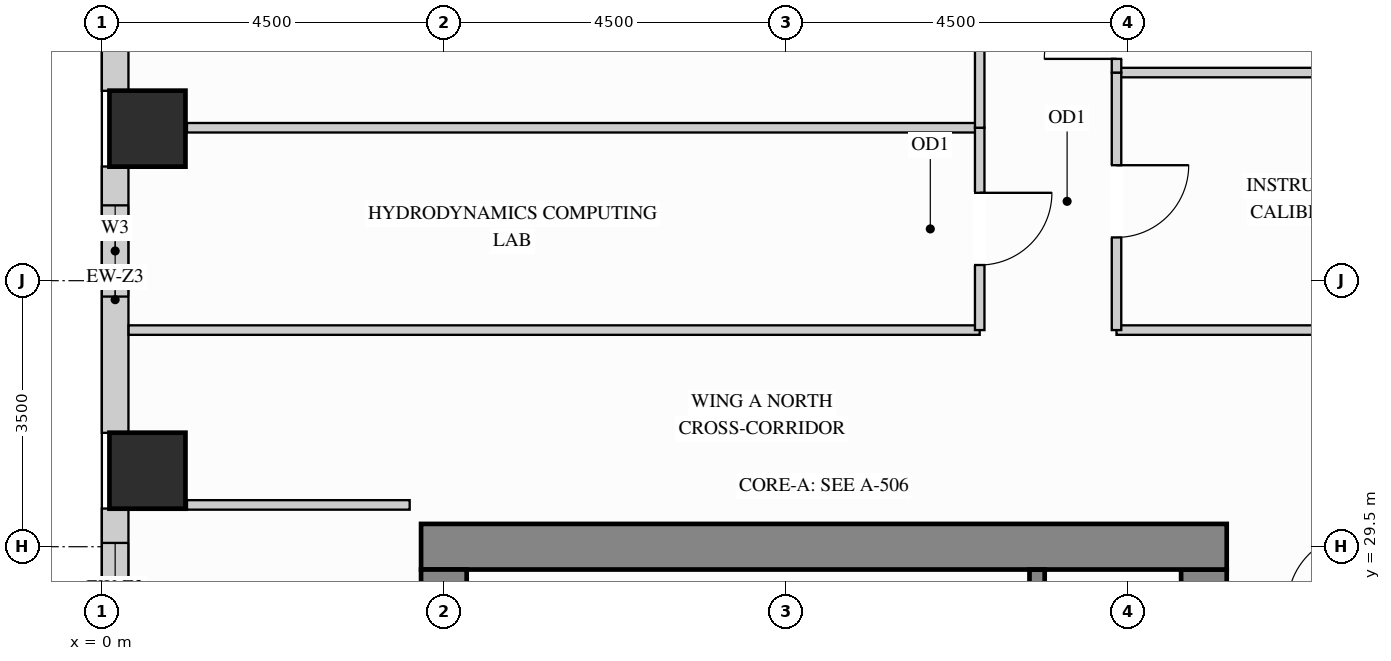
"""IFC4 building model, lengths in metres.
Left out: names, types, materials, properties, quantities, classifications, styles, units other than length and angle.
Written with IfcOpenShell. Run it as: python <this file> out.ifc"""

import sys

from ifc_helpers import new_model, si_unit, direction, frame, frame_2d, origin, origin_2d, place, context, subcontext, project, spatial, rectangle, extrude, source, transform, mapped, element, fill, save


model = new_model("IFC4")
c1 = context("Model", 3, precision=1e-05, world=origin(), true_north=direction((0.0, 1.0)))
c2 = subcontext(c1, "Body", "Model", "MODEL_VIEW")
j1 = project(units=[si_unit("LENGTHUNIT", "METRE"), si_unit("PLANEANGLEUNIT", "RADIAN")], contexts=[c1])
p1 = place(None, origin())
s1 = spatial("IfcSite", under=j1, at=p1, CompositionType="ELEMENT")
p2 = place(p1, origin())
s2 = spatial("IfcBuilding", under=s1, at=p2, CompositionType="ELEMENT")
p3 = place(p2, frame((0.0, 0.0, 161.1)))
s3 = spatial("IfcBuildingStorey", under=s2, at=p3, CompositionType="ELEMENT", Elevation=161.1)
m1 = source(origin(), c2, "Body", "SweptSolid", [
    extrude(rectangle(XDim=1.0, YDim=1.0, at=origin_2d()), origin(), (0.0, 0.0, 1.0), 3.4),
])
for number, where, z_axis, x_axis in (
    (1, (0.6, 30.5, 0.0), (0.0, 0.0, 1.0), (1.0, 0.0, 0.0)),
    (2, (0.6, 35.0, 0.0), (0.0, 0.0, 1.0), (1.0, 0.0, 0.0)),
):
    element("IfcColumn", number, at=place(p3, frame(where, z_axis=z_axis, x_axis=x_axis)), inside=s3, PredefinedType="COLUMN", context=c2, shape_type="MappedRepresentation", body=[
        mapped(m1, transform((0.0, 0.0, 0.0), x_axis=(1.0, 0.0, 0.0), y_axis=(0.0, 1.0, 0.0), z_axis=(0.0, 0.0, 1.0))),
    ])
m2 = source(origin(), c2, "Body", "SweptSolid", [
    extrude(rectangle(XDim=8.32, YDim=0.6, at=frame_2d((4.16, 0.0))), origin(), (0.0, 0.0, 1.0), 3.4),
])
p4 = place(p3, frame((14.5, 20.88, 0.0), z_axis=(0.0, 0.0, 1.0), x_axis=(0.0, 1.0, 0.0)))
e3 = element("IfcWall", 3, at=p4, inside=s3, PredefinedType="SHEAR", context=c2, shape_type="MappedRepresentation", body=[
    mapped(m2, transform((0.0, 0.0, 0.0), x_axis=(1.0, 0.0, 0.0), y_axis=(0.0, 1.0, 0.0), z_axis=(0.0, 0.0, 1.0))),
])
m3 = source(origin(), c2, "Body", "SweptSolid", [
    extrude(rectangle(XDim=10.6, YDim=0.6, at=frame_2d((5.3, 0.0))), origin(), (0.0, 0.0, 1.0), 3.4),
])
p5 = place(p3, frame((4.2, 29.5, 0.0), z_axis=(0.0, 0.0, 1.0), x_axis=(1.0, 0.0, 0.0)))
e4 = element("IfcWall", 4, at=p5, inside=s3, PredefinedType="SHEAR", context=c2, shape_type="MappedRepresentation", body=[
    mapped(m3, transform((0.0, 0.0, 0.0), x_axis=(1.0, 0.0, 0.0), y_axis=(0.0, 1.0, 0.0), z_axis=(0.0, 0.0, 1.0))),
])
m4 = source(origin(), c2, "Body", "SweptSolid", [
    extrude(rectangle(XDim=20.4, YDim=0.6, at=frame_2d((10.2, 0.0))), origin(), (0.0, 0.0, 1.0), 3.4),
])
p6 = place(p3, frame((4.5, 8.8, 0.0), z_axis=(0.0, 0.0, 1.0), x_axis=(0.0, 1.0, 0.0)))
e5 = element("IfcWall", 5, at=p6, inside=s3, PredefinedType="SHEAR", context=c2, shape_type="MappedRepresentation", body=[
    mapped(m4, transform((0.0, 0.0, 0.0), x_axis=(1.0, 0.0, 0.0), y_axis=(0.0, 1.0, 0.0), z_axis=(0.0, 0.0, 1.0))),
])
m5 = source(origin(), c2, "Body", "SweptSolid", [
    extrude(rectangle(XDim=1.904, YDim=0.35, at=frame_2d((0.952, 0.0))), origin(), (0.0, 0.0, 1.0), 2.612),
])
p7 = place(p3, frame((0.175, 37.402, 0.0), z_axis=(0.0, 0.0, 1.0), x_axis=(0.0, -1.0, 0.0)))
e6 = element("IfcWall", 6, at=p7, inside=s3, PredefinedType="SOLIDWALL", context=c2, shape_type="MappedRepresentation", body=[
    mapped(m5, transform((0.0, 0.0, 0.0), x_axis=(1.0, 0.0, 0.0), y_axis=(0.0, 1.0, 0.0), z_axis=(0.0, 0.0, 1.0))),
])
p8 = place(p3, frame((0.175, 34.502, 0.0), z_axis=(0.0, 0.0, 1.0), x_axis=(0.0, -1.0, 0.0)))
e7 = element("IfcWall", 7, at=p8, inside=s3, PredefinedType="SOLIDWALL", context=c2, shape_type="SweptSolid", body=[
    extrude(rectangle(XDim=3.504, YDim=0.35, at=frame_2d((1.752, 0.0))), origin(), (0.0, 0.0, 1.0), 2.612),
])
p9 = place(p8, frame((0.511, 0.0, 0.78)))
e8 = element("IfcOpeningElement", 8, at=p9, cuts=e7, PredefinedType="OPENING", context=c2, shape_type="SweptSolid", body=[
    extrude(rectangle(XDim=1.2, YDim=1.652, at=frame_2d((0.6, 0.826))), frame((0.0, 0.185, 0.0), z_axis=(0.0, -1.0, 0.0), x_axis=(1.0, 0.0, 0.0)), (0.0, 0.0, 1.0), 0.37),
])
p10 = place(p3, frame((0.175, 30.002, 0.0), z_axis=(0.0, 0.0, 1.0), x_axis=(0.0, -1.0, 0.0)))
e9 = element("IfcWall", 9, at=p10, inside=s3, PredefinedType="SOLIDWALL", context=c2, shape_type="SweptSolid", body=[
    extrude(rectangle(XDim=2.704, YDim=0.35, at=frame_2d((1.352, 0.0))), origin(), (0.0, 0.0, 1.0), 2.612),
])
p11 = place(p10, frame((0.452, 0.0, 0.78)))
e10 = element("IfcOpeningElement", 10, at=p11, cuts=e9, PredefinedType="OPENING", context=c2, shape_type="SweptSolid", body=[
    extrude(rectangle(XDim=1.8, YDim=1.652, at=frame_2d((0.9, 0.826))), frame((0.0, 0.185, 0.0), z_axis=(0.0, -1.0, 0.0), x_axis=(1.0, 0.0, 0.0)), (0.0, 0.0, 1.0), 0.37),
])
m6 = source(origin(), c2, "Body", "SweptSolid", [
    extrude(rectangle(XDim=5.798, YDim=0.125, at=frame_2d((2.899, 0.0))), origin(), (0.0, 0.0, 1.0), 3.385),
])
for number, where, z_axis, x_axis in (
    (11, (13.35, 35.738, 0.0), (0.0, 0.0, 1.0), (1.0, 0.0, 0.0)),
    (12, (13.35, 32.35, 0.0), (0.0, 0.0, 1.0), (1.0, 0.0, 0.0)),
):
    element("IfcWall", number, at=place(p3, frame(where, z_axis=z_axis, x_axis=x_axis)), inside=s3, PredefinedType="PARTITIONING", context=c2, shape_type="MappedRepresentation", body=[
        mapped(m6, transform((0.0, 0.0, 0.0), x_axis=(1.0, 0.0, 0.0), y_axis=(0.0, 1.0, 0.0), z_axis=(0.0, 0.0, 1.0))),
    ])
m7 = source(origin(), c2, "Body", "SweptSolid", [
    extrude(rectangle(XDim=11.198, YDim=0.125, at=frame_2d((5.599, 0.0))), origin(), (0.0, 0.0, 1.0), 3.385),
])
p12 = place(p3, frame((0.352, 32.35, 0.0), z_axis=(0.0, 0.0, 1.0), x_axis=(1.0, 0.0, 0.0)))
e13 = element("IfcWall", 13, at=p12, inside=s3, PredefinedType="PARTITIONING", context=c2, shape_type="MappedRepresentation", body=[
    mapped(m7, transform((0.0, 0.0, 0.0), x_axis=(1.0, 0.0, 0.0), y_axis=(0.0, 1.0, 0.0), z_axis=(0.0, 0.0, 1.0))),
])
m8 = source(origin(), c2, "Body", "SweptSolid", [
    extrude(rectangle(XDim=10.43, YDim=0.125, at=frame_2d((5.215, 0.0))), origin(), (0.0, 0.0, 1.0), 3.385),
])
p13 = place(p3, frame((1.12, 35.012, 0.0), z_axis=(0.0, 0.0, 1.0), x_axis=(1.0, 0.0, 0.0)))
e14 = element("IfcWall", 14, at=p13, inside=s3, PredefinedType="PARTITIONING", context=c2, shape_type="MappedRepresentation", body=[
    mapped(m8, transform((0.0, 0.0, 0.0), x_axis=(1.0, 0.0, 0.0), y_axis=(0.0, 1.0, 0.0), z_axis=(0.0, 0.0, 1.0))),
])
m9 = source(origin(), c2, "Body", "SweptSolid", [
    extrude(rectangle(XDim=2.93, YDim=0.125, at=frame_2d((1.465, 0.0))), origin(), (0.0, 0.0, 1.0), 3.385),
])
p14 = place(p3, frame((1.12, 30.05, 0.0), z_axis=(0.0, 0.0, 1.0), x_axis=(1.0, 0.0, 0.0)))
e15 = element("IfcWall", 15, at=p14, inside=s3, PredefinedType="PARTITIONING", context=c2, shape_type="MappedRepresentation", body=[
    mapped(m9, transform((0.0, 0.0, 0.0), x_axis=(1.0, 0.0, 0.0), y_axis=(0.0, 1.0, 0.0), z_axis=(0.0, 0.0, 1.0))),
])
p15 = place(p3, frame((13.35, 32.35, 0.0), z_axis=(0.0, 0.0, 1.0), x_axis=(0.0, 1.0, 0.0)))
e16 = element("IfcWall", 16, at=p15, inside=s3, PredefinedType="PARTITIONING", context=c2, shape_type="SweptSolid", body=[
    extrude(rectangle(XDim=3.388, YDim=0.125, at=frame_2d((1.694, 0.0))), origin(), (0.0, 0.0, 1.0), 3.385),
])
p16 = place(p15, frame((1.219, 0.0, 0.0)))
e17 = element("IfcOpeningElement", 17, at=p16, cuts=e16, PredefinedType="OPENING", context=c2, shape_type="SweptSolid", body=[
    extrude(rectangle(XDim=0.95, YDim=2.15, at=frame_2d((0.475, 1.075))), frame((0.0, 0.073, 0.0), z_axis=(0.0, -1.0, 0.0), x_axis=(1.0, 0.0, 0.0)), (0.0, 0.0, 1.0), 0.145),
])
p17 = place(p3, frame((13.35, 35.738, 0.0), z_axis=(0.0, 0.0, 1.0), x_axis=(0.0, 1.0, 0.0)))
e18 = element("IfcWall", 18, at=p17, inside=s3, PredefinedType="PARTITIONING", context=c2, shape_type="SweptSolid", body=[
    extrude(rectangle(XDim=2.662, YDim=0.125, at=frame_2d((1.331, 0.0))), origin(), (0.0, 0.0, 1.0), 3.385),
])
p18 = place(p17, frame((0.18, 0.0, 0.0)))
e19 = element("IfcOpeningElement", 19, at=p18, cuts=e18, PredefinedType="OPENING", context=c2, shape_type="SweptSolid", body=[
    extrude(rectangle(XDim=0.95, YDim=2.15, at=frame_2d((0.475, 1.075))), frame((0.0, 0.073, 0.0), z_axis=(0.0, -1.0, 0.0), x_axis=(1.0, 0.0, 0.0)), (0.0, 0.0, 1.0), 0.145),
])
p19 = place(p3, frame((11.55, 32.35, 0.0), z_axis=(0.0, 0.0, 1.0), x_axis=(0.0, 1.0, 0.0)))
e20 = element("IfcWall", 20, at=p19, inside=s3, PredefinedType="PARTITIONING", context=c2, shape_type="SweptSolid", body=[
    extrude(rectangle(XDim=2.662, YDim=0.125, at=frame_2d((1.331, 0.0))), origin(), (0.0, 0.0, 1.0), 3.385),
])
p20 = place(p19, frame((0.856, 0.0, 0.0)))
e21 = element("IfcOpeningElement", 21, at=p20, cuts=e20, PredefinedType="OPENING", context=c2, shape_type="SweptSolid", body=[
    extrude(rectangle(XDim=0.95, YDim=2.15, at=frame_2d((0.475, 1.075))), frame((0.0, 0.073, 0.0), z_axis=(0.0, -1.0, 0.0), x_axis=(1.0, 0.0, 0.0)), (0.0, 0.0, 1.0), 0.145),
])
p21 = place(p3, frame((11.55, 35.012, 0.0), z_axis=(0.0, 0.0, 1.0), x_axis=(0.0, 1.0, 0.0)))
e22 = element("IfcWall", 22, at=p21, inside=s3, PredefinedType="PARTITIONING", context=c2, shape_type="SweptSolid", body=[
    extrude(rectangle(XDim=3.388, YDim=0.125, at=frame_2d((1.694, 0.0))), origin(), (0.0, 0.0, 1.0), 3.385),
])
p22 = place(p21, frame((1.219, 0.0, 0.0)))
e23 = element("IfcOpeningElement", 23, at=p22, cuts=e22, PredefinedType="OPENING", context=c2, shape_type="SweptSolid", body=[
    extrude(rectangle(XDim=0.95, YDim=2.15, at=frame_2d((0.475, 1.075))), frame((0.0, 0.073, 0.0), z_axis=(0.0, -1.0, 0.0), x_axis=(1.0, 0.0, 0.0)), (0.0, 0.0, 1.0), 0.145),
])
m10 = source(origin(), c2, "Body", "SweptSolid", [
    extrude(rectangle(XDim=3.753, YDim=0.2, at=frame_2d((1.876, 0.0))), origin(), (0.0, 0.0, 1.0), 3.4),
])
p23 = place(p3, frame((12.305, 25.445, 0.0), z_axis=(0.0, 0.0, 1.0), x_axis=(0.0, 1.0, 0.0)))
e24 = element("IfcWall", 24, at=p23, inside=s3, PredefinedType="SHEAR", context=c2, shape_type="MappedRepresentation", body=[
    mapped(m10, transform((0.0, 0.0, 0.0), x_axis=(1.0, 0.0, 0.0), y_axis=(0.0, 1.0, 0.0), z_axis=(0.0, 0.0, 1.0))),
])
m11 = source(origin(), c2, "Body", "SweptSolid", [
    extrude(rectangle(XDim=0.95, YDim=2.15, at=frame_2d((0.475, 1.075))), frame((0.0, 0.025, 0.0), z_axis=(0.0, -1.0, 0.0), x_axis=(1.0, 0.0, 0.0)), (0.0, 0.0, 1.0), 0.05),
])
p24 = place(p16, origin())
e25 = element("IfcDoor", 25, at=p24, inside=s3, OperationType="SINGLE_SWING_RIGHT", PredefinedType="DOOR", context=c2, shape_type="MappedRepresentation", body=[
    mapped(m11, transform((0.0, 0.0, 0.0), x_axis=(1.0, 0.0, 0.0), y_axis=(0.0, 1.0, 0.0), z_axis=(0.0, 0.0, 1.0))),
])
fill(e17, e25)
p25 = place(p18, origin())
e26 = element("IfcDoor", 26, at=p25, inside=s3, OperationType="SINGLE_SWING_LEFT", PredefinedType="DOOR", context=c2, shape_type="MappedRepresentation", body=[
    mapped(m11, transform((0.0, 0.0, 0.0), x_axis=(1.0, 0.0, 0.0), y_axis=(0.0, 1.0, 0.0), z_axis=(0.0, 0.0, 1.0))),
])
fill(e19, e26)
p26 = place(p20, origin())
e27 = element("IfcDoor", 27, at=p26, inside=s3, OperationType="SINGLE_SWING_RIGHT", PredefinedType="DOOR", context=c2, shape_type="MappedRepresentation", body=[
    mapped(m11, transform((0.0, 0.0, 0.0), x_axis=(1.0, 0.0, 0.0), y_axis=(0.0, 1.0, 0.0), z_axis=(0.0, 0.0, 1.0))),
])
fill(e21, e27)
m12 = source(origin(), c2, "Body", "SweptSolid", [
    extrude(rectangle(XDim=1.8, YDim=1.652, at=frame_2d((0.9, 0.826))), frame((0.0, 0.03, 0.0), z_axis=(0.0, -1.0, 0.0), x_axis=(1.0, 0.0, 0.0)), (0.0, 0.0, 1.0), 0.06),
])
p27 = place(p11, origin())
e28 = element("IfcWindow", 28, at=p27, inside=s3, PartitioningType="SINGLE_PANEL", PredefinedType="WINDOW", context=c2, shape_type="MappedRepresentation", body=[
    mapped(m12, transform((0.0, 0.0, 0.0), x_axis=(1.0, 0.0, 0.0), y_axis=(0.0, 1.0, 0.0), z_axis=(0.0, 0.0, 1.0))),
])
fill(e10, e28)
m13 = source(origin(), c2, "Body", "SweptSolid", [
    extrude(rectangle(XDim=1.2, YDim=1.652, at=frame_2d((0.6, 0.826))), frame((0.0, 0.03, 0.0), z_axis=(0.0, -1.0, 0.0), x_axis=(1.0, 0.0, 0.0)), (0.0, 0.0, 1.0), 0.06),
])
p28 = place(p9, origin())
e29 = element("IfcWindow", 29, at=p28, inside=s3, PartitioningType="SINGLE_PANEL", PredefinedType="WINDOW", context=c2, shape_type="MappedRepresentation", body=[
    mapped(m13, transform((0.0, 0.0, 0.0), x_axis=(1.0, 0.0, 0.0), y_axis=(0.0, 1.0, 0.0), z_axis=(0.0, 0.0, 1.0))),
])
fill(e8, e29)
save(model, sys.argv[1])
